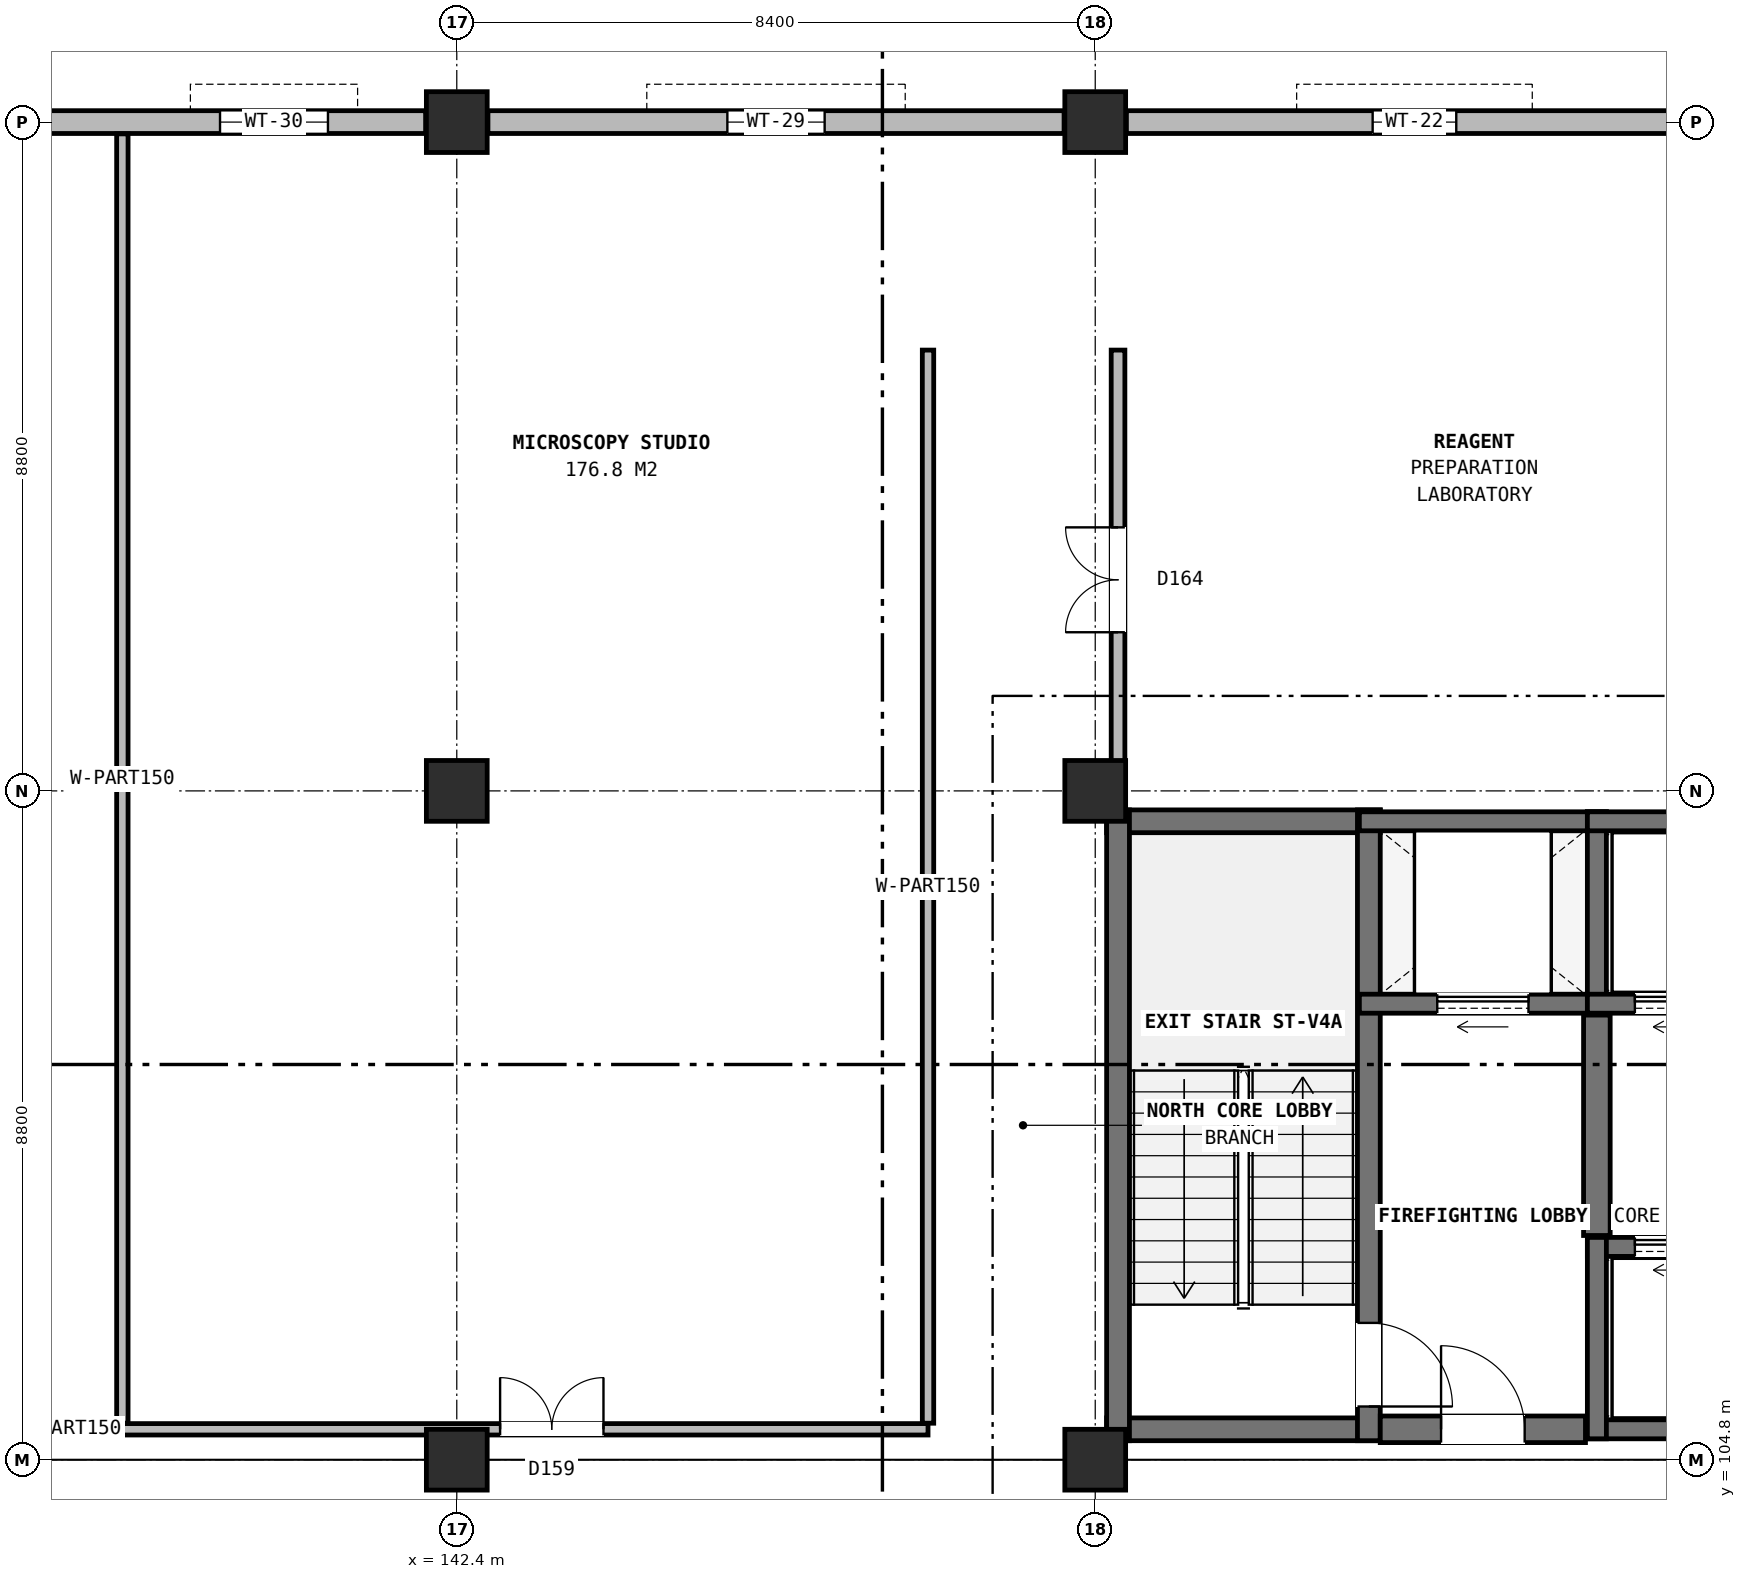
"""IFC4 building model, lengths in metres.
Left out: names, types, materials, properties, quantities, classifications, styles, units other than length and angle.
Written with IfcOpenShell. Run it as: python <this file> out.ifc"""

import sys

from ifc_helpers import new_model, si_unit, direction, frame, frame_2d, origin, origin_2d, place, context, subcontext, project, spatial, rectangle, extrude, element, fill, save


model = new_model("IFC4")
c1 = context("Model", 3, precision=1e-05, world=origin(), true_north=direction((0.0, 1.0)))
c2 = subcontext(c1, "Body", "Model", "MODEL_VIEW")
j1 = project(units=[si_unit("LENGTHUNIT", "METRE"), si_unit("PLANEANGLEUNIT", "RADIAN")], contexts=[c1])
p1 = place(None, origin())
s1 = spatial("IfcSite", under=j1, at=p1, CompositionType="ELEMENT")
p2 = place(p1, origin())
s2 = spatial("IfcBuilding", under=s1, at=p2, CompositionType="ELEMENT")
p3 = place(p2, frame((0.0, 0.0, 4.8)))
s3 = spatial("IfcBuildingStorey", under=s2, at=p3, CompositionType="ELEMENT", Elevation=4.8)
for number, where, z_axis, x_axis in (
    (1, (142.4, 104.8, 0.0), (0.0, 0.0, 1.0), (1.0, 0.0, 0.0)),
    (2, (142.4, 113.6, 0.0), (0.0, 0.0, 1.0), (1.0, 0.0, 0.0)),
    (3, (142.4, 122.4, 0.0), (0.0, 0.0, 1.0), (1.0, 0.0, 0.0)),
    (4, (150.8, 104.8, 0.0), (0.0, 0.0, 1.0), (1.0, 0.0, 0.0)),
    (5, (150.8, 113.6, 0.0), (0.0, 0.0, 1.0), (1.0, 0.0, 0.0)),
    (6, (150.8, 122.4, 0.0), (0.0, 0.0, 1.0), (1.0, 0.0, 0.0)),
):
    element("IfcColumn", number, at=place(p3, frame(where, z_axis=z_axis, x_axis=x_axis)), inside=s3, PredefinedType="COLUMN", context=c2, shape_type="SweptSolid", body=[
        extrude(rectangle(XDim=0.8, YDim=0.8, at=origin_2d()), origin(), (0.0, 0.0, 1.0), 4.2),
    ])
p4 = place(p3, frame((158.79, 122.4, 0.0), z_axis=(0.0, 0.0, 1.0), x_axis=(-1.0, 0.0, 0.0)))
e7 = element("IfcWall", 7, at=p4, inside=s3, PredefinedType="SOLIDWALL", context=c2, shape_type="SweptSolid", body=[
    extrude(rectangle(XDim=7.58, YDim=0.3, at=frame_2d((3.79, 0.0))), origin(), (0.0, 0.0, 1.0), 3.45),
])
p5 = place(p4, frame((3.24, 0.0, 0.9)))
e8 = element("IfcOpeningElement", 8, at=p5, cuts=e7, PredefinedType="OPENING", context=c2, shape_type="SweptSolid", body=[
    extrude(rectangle(XDim=1.1, YDim=1.65, at=frame_2d((0.55, 0.825))), frame((0.0, 0.16, 0.0), z_axis=(0.0, -1.0, 0.0), x_axis=(1.0, 0.0, 0.0)), (0.0, 0.0, 1.0), 0.32),
])
p6 = place(p3, frame((150.39, 122.4, 0.0), z_axis=(0.0, 0.0, 1.0), x_axis=(-1.0, 0.0, 0.0)))
e9 = element("IfcWall", 9, at=p6, inside=s3, PredefinedType="SOLIDWALL", context=c2, shape_type="SweptSolid", body=[
    extrude(rectangle(XDim=7.58, YDim=0.3, at=frame_2d((3.79, 0.0))), origin(), (0.0, 0.0, 1.0), 3.45),
])
p7 = place(p6, frame((3.15, 0.0, 0.9)))
e10 = element("IfcOpeningElement", 10, at=p7, cuts=e9, PredefinedType="OPENING", context=c2, shape_type="SweptSolid", body=[
    extrude(rectangle(XDim=1.28, YDim=1.82, at=frame_2d((0.64, 0.91))), frame((0.0, 0.16, 0.0), z_axis=(0.0, -1.0, 0.0), x_axis=(1.0, 0.0, 0.0)), (0.0, 0.0, 1.0), 0.32),
])
p8 = place(p3, frame((141.99, 122.4, 0.0), z_axis=(0.0, 0.0, 1.0), x_axis=(-1.0, 0.0, 0.0)))
e11 = element("IfcWall", 11, at=p8, inside=s3, PredefinedType="SOLIDWALL", context=c2, shape_type="SweptSolid", body=[
    extrude(rectangle(XDim=7.58, YDim=0.3, at=frame_2d((3.79, 0.0))), origin(), (0.0, 0.0, 1.0), 3.45),
])
p9 = place(p8, frame((1.285, 0.0, 0.9)))
e12 = element("IfcOpeningElement", 12, at=p9, cuts=e11, PredefinedType="OPENING", context=c2, shape_type="SweptSolid", body=[
    extrude(rectangle(XDim=1.42, YDim=1.86, at=frame_2d((0.71, 0.93))), frame((0.0, 0.16, 0.0), z_axis=(0.0, -1.0, 0.0), x_axis=(1.0, 0.0, 0.0)), (0.0, 0.0, 1.0), 0.32),
])
for number, where, z_axis, x_axis in (
    (13, (150.95, 105.2, 0.0), (0.0, 0.0, 1.0), (1.0, 0.0, 0.0)),
    (14, (150.95, 113.2, 0.0), (0.0, 0.0, 1.0), (1.0, 0.0, 0.0)),
):
    element("IfcWall", number, at=place(p3, frame(where, z_axis=z_axis, x_axis=x_axis)), inside=s3, PredefinedType="SHEAR", context=c2, shape_type="SweptSolid", body=[
        extrude(rectangle(XDim=3.6, YDim=0.3, at=frame_2d((1.8, 0.0))), origin(), (0.0, 0.0, 1.0), 4.2),
    ])
p10 = place(p3, frame((151.1, 105.05, 0.0), z_axis=(0.0, 0.0, 1.0), x_axis=(0.0, 1.0, 0.0)))
e15 = element("IfcWall", 15, at=p10, inside=s3, PredefinedType="SHEAR", context=c2, shape_type="SweptSolid", body=[
    extrude(rectangle(XDim=8.3, YDim=0.3, at=frame_2d((4.15, 0.0))), origin(), (0.0, 0.0, 1.0), 4.2),
])
p11 = place(p3, frame((154.4, 105.05, 0.0), z_axis=(0.0, 0.0, 1.0), x_axis=(0.0, 1.0, 0.0)))
e16 = element("IfcWall", 16, at=p11, inside=s3, PredefinedType="SHEAR", context=c2, shape_type="SweptSolid", body=[
    extrude(rectangle(XDim=8.3, YDim=0.3, at=frame_2d((4.15, 0.0))), origin(), (0.0, 0.0, 1.0), 4.2),
])
p12 = place(p11, frame((0.45, 0.0, 0.0)))
e17 = element("IfcOpeningElement", 17, at=p12, cuts=e16, PredefinedType="OPENING", context=c2, shape_type="SweptSolid", body=[
    extrude(rectangle(XDim=1.1, YDim=2.2, at=frame_2d((0.55, 1.1))), frame((0.0, 0.16, 0.0), z_axis=(0.0, -1.0, 0.0), x_axis=(1.0, 0.0, 0.0)), (0.0, 0.0, 1.0), 0.32),
])
p13 = place(p3, frame((154.275, 110.8, 0.0), z_axis=(0.0, 0.0, 1.0), x_axis=(1.0, 0.0, 0.0)))
e18 = element("IfcWall", 18, at=p13, inside=s3, PredefinedType="SOLIDWALL", context=c2, shape_type="SweptSolid", body=[
    extrude(rectangle(XDim=3.25, YDim=0.25, at=frame_2d((1.625, 0.0))), origin(), (0.0, 0.0, 1.0), 3.88),
])
p14 = place(p13, frame((1.025, 0.0, 0.0)))
e19 = element("IfcOpeningElement", 19, at=p14, cuts=e18, PredefinedType="OPENING", context=c2, shape_type="SweptSolid", body=[
    extrude(rectangle(XDim=1.2, YDim=2.2, at=frame_2d((0.6, 1.1))), frame((0.0, 0.135, 0.0), z_axis=(0.0, -1.0, 0.0), x_axis=(1.0, 0.0, 0.0)), (0.0, 0.0, 1.0), 0.27),
])
p15 = place(p3, frame((154.275, 113.2, 0.0), z_axis=(0.0, 0.0, 1.0), x_axis=(1.0, 0.0, 0.0)))
e20 = element("IfcWall", 20, at=p15, inside=s3, PredefinedType="SOLIDWALL", context=c2, shape_type="SweptSolid", body=[
    extrude(rectangle(XDim=3.25, YDim=0.25, at=frame_2d((1.625, 0.0))), origin(), (0.0, 0.0, 1.0), 3.88),
])
p16 = place(p3, frame((157.4, 110.675, 0.0), z_axis=(0.0, 0.0, 1.0), x_axis=(0.0, 1.0, 0.0)))
e21 = element("IfcWall", 21, at=p16, inside=s3, PredefinedType="SOLIDWALL", context=c2, shape_type="SweptSolid", body=[
    extrude(rectangle(XDim=2.65, YDim=0.25, at=frame_2d((1.325, 0.0))), origin(), (0.0, 0.0, 1.0), 3.88),
])
p17 = place(p3, frame((157.275, 110.8, 0.0), z_axis=(0.0, 0.0, 1.0), x_axis=(1.0, 0.0, 0.0)))
e22 = element("IfcWall", 22, at=p17, inside=s3, PredefinedType="SOLIDWALL", context=c2, shape_type="SweptSolid", body=[
    extrude(rectangle(XDim=2.35, YDim=0.25, at=frame_2d((1.175, 0.0))), origin(), (0.0, 0.0, 1.0), 3.88),
])
p18 = place(p17, frame((0.625, 0.0, 0.0)))
e23 = element("IfcOpeningElement", 23, at=p18, cuts=e22, PredefinedType="OPENING", context=c2, shape_type="SweptSolid", body=[
    extrude(rectangle(XDim=1.1, YDim=2.2, at=frame_2d((0.55, 1.1))), frame((0.0, 0.135, 0.0), z_axis=(0.0, -1.0, 0.0), x_axis=(1.0, 0.0, 0.0)), (0.0, 0.0, 1.0), 0.27),
])
for number, where, z_axis, x_axis in (
    (24, (157.275, 113.2, 0.0), (0.0, 0.0, 1.0), (1.0, 0.0, 0.0)),
    (25, (157.275, 105.2, 0.0), (0.0, 0.0, 1.0), (1.0, 0.0, 0.0)),
):
    element("IfcWall", number, at=place(p3, frame(where, z_axis=z_axis, x_axis=x_axis)), inside=s3, PredefinedType="SOLIDWALL", context=c2, shape_type="SweptSolid", body=[
        extrude(rectangle(XDim=2.35, YDim=0.25, at=frame_2d((1.175, 0.0))), origin(), (0.0, 0.0, 1.0), 3.88),
    ])
p19 = place(p3, frame((157.275, 107.6, 0.0), z_axis=(0.0, 0.0, 1.0), x_axis=(1.0, 0.0, 0.0)))
e26 = element("IfcWall", 26, at=p19, inside=s3, PredefinedType="SOLIDWALL", context=c2, shape_type="SweptSolid", body=[
    extrude(rectangle(XDim=2.35, YDim=0.25, at=frame_2d((1.175, 0.0))), origin(), (0.0, 0.0, 1.0), 3.88),
])
p20 = place(p19, frame((0.625, 0.0, 0.0)))
e27 = element("IfcOpeningElement", 27, at=p20, cuts=e26, PredefinedType="OPENING", context=c2, shape_type="SweptSolid", body=[
    extrude(rectangle(XDim=1.1, YDim=2.2, at=frame_2d((0.55, 1.1))), frame((0.0, 0.135, 0.0), z_axis=(0.0, -1.0, 0.0), x_axis=(1.0, 0.0, 0.0)), (0.0, 0.0, 1.0), 0.27),
])
p21 = place(p3, frame((157.4, 105.075, 0.0), z_axis=(0.0, 0.0, 1.0), x_axis=(0.0, 1.0, 0.0)))
e28 = element("IfcWall", 28, at=p21, inside=s3, PredefinedType="SOLIDWALL", context=c2, shape_type="SweptSolid", body=[
    extrude(rectangle(XDim=2.65, YDim=0.25, at=frame_2d((1.325, 0.0))), origin(), (0.0, 0.0, 1.0), 3.88),
])
p22 = place(p3, frame((157.4, 107.75, 0.0), z_axis=(0.0, 0.0, 1.0), x_axis=(0.0, 1.0, 0.0)))
e29 = element("IfcWall", 29, at=p22, inside=s3, PredefinedType="SHEAR", context=c2, shape_type="SweptSolid", body=[
    extrude(rectangle(XDim=2.9, YDim=0.35, at=frame_2d((1.45, 0.0))), origin(), (0.0, 0.0, 1.0), 3.88),
])
p23 = place(p3, frame((154.55, 105.2, 0.0), z_axis=(0.0, 0.0, 1.0), x_axis=(1.0, 0.0, 0.0)))
e30 = element("IfcWall", 30, at=p23, inside=s3, PredefinedType="SHEAR", context=c2, shape_type="SweptSolid", body=[
    extrude(rectangle(XDim=2.7, YDim=0.35, at=frame_2d((1.35, 0.0))), origin(), (0.0, 0.0, 1.0), 3.88),
])
p24 = place(p23, frame((0.8, 0.0, 0.0)))
e31 = element("IfcOpeningElement", 31, at=p24, cuts=e30, PredefinedType="OPENING", context=c2, shape_type="SweptSolid", body=[
    extrude(rectangle(XDim=1.1, YDim=2.2, at=frame_2d((0.55, 1.1))), frame((0.0, 0.185, 0.0), z_axis=(0.0, -1.0, 0.0), x_axis=(1.0, 0.0, 0.0)), (0.0, 0.0, 1.0), 0.37),
])
p25 = place(p3, frame((126.0, 105.2, 0.0), z_axis=(0.0, 0.0, 1.0), x_axis=(1.0, 0.0, 0.0)))
e32 = element("IfcWall", 32, at=p25, inside=s3, PredefinedType="PARTITIONING", context=c2, shape_type="SweptSolid", body=[
    extrude(rectangle(XDim=12.0, YDim=0.15, at=frame_2d((6.0, 0.0))), origin(), (0.0, 0.0, 1.0), 3.445),
])
p26 = place(p25, frame((5.37, 0.0, 0.0)))
e33 = element("IfcOpeningElement", 33, at=p26, cuts=e32, PredefinedType="OPENING", context=c2, shape_type="SweptSolid", body=[
    extrude(rectangle(XDim=1.26, YDim=2.28, at=frame_2d((0.63, 1.14))), frame((0.0, 0.085, 0.0), z_axis=(0.0, -1.0, 0.0), x_axis=(1.0, 0.0, 0.0)), (0.0, 0.0, 1.0), 0.17),
])
p27 = place(p3, frame((138.0, 105.2, 0.0), z_axis=(0.0, 0.0, 1.0), x_axis=(1.0, 0.0, 0.0)))
e34 = element("IfcWall", 34, at=p27, inside=s3, PredefinedType="PARTITIONING", context=c2, shape_type="SweptSolid", body=[
    extrude(rectangle(XDim=10.6, YDim=0.15, at=frame_2d((5.3, 0.0))), origin(), (0.0, 0.0, 1.0), 3.445),
])
p28 = place(p27, frame((4.97, 0.0, 0.0)))
e35 = element("IfcOpeningElement", 35, at=p28, cuts=e34, PredefinedType="OPENING", context=c2, shape_type="SweptSolid", body=[
    extrude(rectangle(XDim=1.36, YDim=2.26, at=frame_2d((0.68, 1.13))), frame((0.0, 0.085, 0.0), z_axis=(0.0, -1.0, 0.0), x_axis=(1.0, 0.0, 0.0)), (0.0, 0.0, 1.0), 0.17),
])
p29 = place(p3, frame((148.6, 105.28, 0.0), z_axis=(0.0, 0.0, 1.0), x_axis=(0.0, 1.0, 0.0)))
e36 = element("IfcWall", 36, at=p29, inside=s3, PredefinedType="PARTITIONING", context=c2, shape_type="SweptSolid", body=[
    extrude(rectangle(XDim=14.12, YDim=0.15, at=frame_2d((7.06, 0.0))), origin(), (0.0, 0.0, 1.0), 3.865),
])
p30 = place(p3, frame((151.1, 113.355, 0.0), z_axis=(0.0, 0.0, 1.0), x_axis=(0.0, 1.0, 0.0)))
e37 = element("IfcWall", 37, at=p30, inside=s3, PredefinedType="PARTITIONING", context=c2, shape_type="SweptSolid", body=[
    extrude(rectangle(XDim=6.045, YDim=0.18, at=frame_2d((3.022, 0.0))), origin(), (0.0, 0.0, 1.0), 3.445),
])
p31 = place(p30, frame((2.333, 0.0, 0.0)))
e38 = element("IfcOpeningElement", 38, at=p31, cuts=e37, PredefinedType="OPENING", context=c2, shape_type="SweptSolid", body=[
    extrude(rectangle(XDim=1.38, YDim=2.2, at=frame_2d((0.69, 1.1))), frame((0.0, 0.1, 0.0), z_axis=(0.0, -1.0, 0.0), x_axis=(1.0, 0.0, 0.0)), (0.0, 0.0, 1.0), 0.2),
])
p32 = place(p3, frame((138.0, 105.28, 0.0), z_axis=(0.0, 0.0, 1.0), x_axis=(0.0, 1.0, 0.0)))
e39 = element("IfcWall", 39, at=p32, inside=s3, PredefinedType="PARTITIONING", context=c2, shape_type="SweptSolid", body=[
    extrude(rectangle(XDim=16.965, YDim=0.15, at=frame_2d((8.482, 0.0))), origin(), (0.0, 0.0, 1.0), 3.865),
])
p33 = place(p5, origin())
e40 = element("IfcWindow", 40, at=p33, inside=s3, PartitioningType="SINGLE_PANEL", PredefinedType="WINDOW", context=c2, shape_type="SweptSolid", body=[
    extrude(rectangle(XDim=1.1, YDim=1.65, at=frame_2d((0.55, 0.825))), frame((0.0, 0.03, 0.0), z_axis=(0.0, -1.0, 0.0), x_axis=(1.0, 0.0, 0.0)), (0.0, 0.0, 1.0), 0.06),
])
fill(e8, e40)
p34 = place(p7, origin())
e41 = element("IfcWindow", 41, at=p34, inside=s3, PartitioningType="SINGLE_PANEL", PredefinedType="WINDOW", context=c2, shape_type="SweptSolid", body=[
    extrude(rectangle(XDim=1.28, YDim=1.82, at=frame_2d((0.64, 0.91))), frame((0.0, 0.03, 0.0), z_axis=(0.0, -1.0, 0.0), x_axis=(1.0, 0.0, 0.0)), (0.0, 0.0, 1.0), 0.06),
])
fill(e10, e41)
p35 = place(p9, origin())
e42 = element("IfcWindow", 42, at=p35, inside=s3, PartitioningType="SINGLE_PANEL", PredefinedType="WINDOW", context=c2, shape_type="SweptSolid", body=[
    extrude(rectangle(XDim=1.42, YDim=1.86, at=frame_2d((0.71, 0.93))), frame((0.0, 0.03, 0.0), z_axis=(0.0, -1.0, 0.0), x_axis=(1.0, 0.0, 0.0)), (0.0, 0.0, 1.0), 0.06),
])
fill(e12, e42)
p36 = place(p12, frame((1.1, 0.0, 0.0), z_axis=(0.0, 0.0, 1.0), x_axis=(-1.0, 0.0, 0.0)))
e43 = element("IfcDoor", 43, at=p36, inside=s3, OperationType="SINGLE_SWING_LEFT", PredefinedType="DOOR", context=c2, shape_type="SweptSolid", body=[
    extrude(rectangle(XDim=1.1, YDim=2.2, at=frame_2d((0.55, 1.1))), frame((0.0, 0.025, 0.0), z_axis=(0.0, -1.0, 0.0), x_axis=(1.0, 0.0, 0.0)), (0.0, 0.0, 1.0), 0.05),
])
fill(e17, e43)
p37 = place(p14, origin())
e44 = element("IfcDoor", 44, at=p37, inside=s3, OperationType="SLIDING_TO_LEFT", PredefinedType="DOOR", context=c2, shape_type="SweptSolid", body=[
    extrude(rectangle(XDim=1.2, YDim=2.2, at=frame_2d((0.6, 1.1))), frame((0.0, 0.025, 0.0), z_axis=(0.0, -1.0, 0.0), x_axis=(1.0, 0.0, 0.0)), (0.0, 0.0, 1.0), 0.05),
])
fill(e19, e44)
p38 = place(p18, origin())
e45 = element("IfcDoor", 45, at=p38, inside=s3, OperationType="SLIDING_TO_LEFT", PredefinedType="DOOR", context=c2, shape_type="SweptSolid", body=[
    extrude(rectangle(XDim=1.1, YDim=2.2, at=frame_2d((0.55, 1.1))), frame((0.0, 0.025, 0.0), z_axis=(0.0, -1.0, 0.0), x_axis=(1.0, 0.0, 0.0)), (0.0, 0.0, 1.0), 0.05),
])
fill(e23, e45)
p39 = place(p20, origin())
e46 = element("IfcDoor", 46, at=p39, inside=s3, OperationType="SLIDING_TO_LEFT", PredefinedType="DOOR", context=c2, shape_type="SweptSolid", body=[
    extrude(rectangle(XDim=1.1, YDim=2.2, at=frame_2d((0.55, 1.1))), frame((0.0, 0.025, 0.0), z_axis=(0.0, -1.0, 0.0), x_axis=(1.0, 0.0, 0.0)), (0.0, 0.0, 1.0), 0.05),
])
fill(e27, e46)
p40 = place(p24, origin())
e47 = element("IfcDoor", 47, at=p40, inside=s3, OperationType="SINGLE_SWING_LEFT", PredefinedType="DOOR", context=c2, shape_type="SweptSolid", body=[
    extrude(rectangle(XDim=1.1, YDim=2.2, at=frame_2d((0.55, 1.1))), frame((0.0, 0.025, 0.0), z_axis=(0.0, -1.0, 0.0), x_axis=(1.0, 0.0, 0.0)), (0.0, 0.0, 1.0), 0.05),
])
fill(e31, e47)
p41 = place(p28, origin())
e48 = element("IfcDoor", 48, at=p41, inside=s3, OperationType="DOUBLE_DOOR_SINGLE_SWING", PredefinedType="DOOR", context=c2, shape_type="SweptSolid", body=[
    extrude(rectangle(XDim=1.36, YDim=2.26, at=frame_2d((0.68, 1.13))), frame((0.0, 0.025, 0.0), z_axis=(0.0, -1.0, 0.0), x_axis=(1.0, 0.0, 0.0)), (0.0, 0.0, 1.0), 0.05),
])
fill(e35, e48)
p42 = place(p31, origin())
e49 = element("IfcDoor", 49, at=p42, inside=s3, OperationType="DOUBLE_DOOR_SINGLE_SWING", PredefinedType="DOOR", context=c2, shape_type="SweptSolid", body=[
    extrude(rectangle(XDim=1.38, YDim=2.2, at=frame_2d((0.69, 1.1))), frame((0.0, 0.025, 0.0), z_axis=(0.0, -1.0, 0.0), x_axis=(1.0, 0.0, 0.0)), (0.0, 0.0, 1.0), 0.05),
])
fill(e38, e49)
save(model, sys.argv[1])
